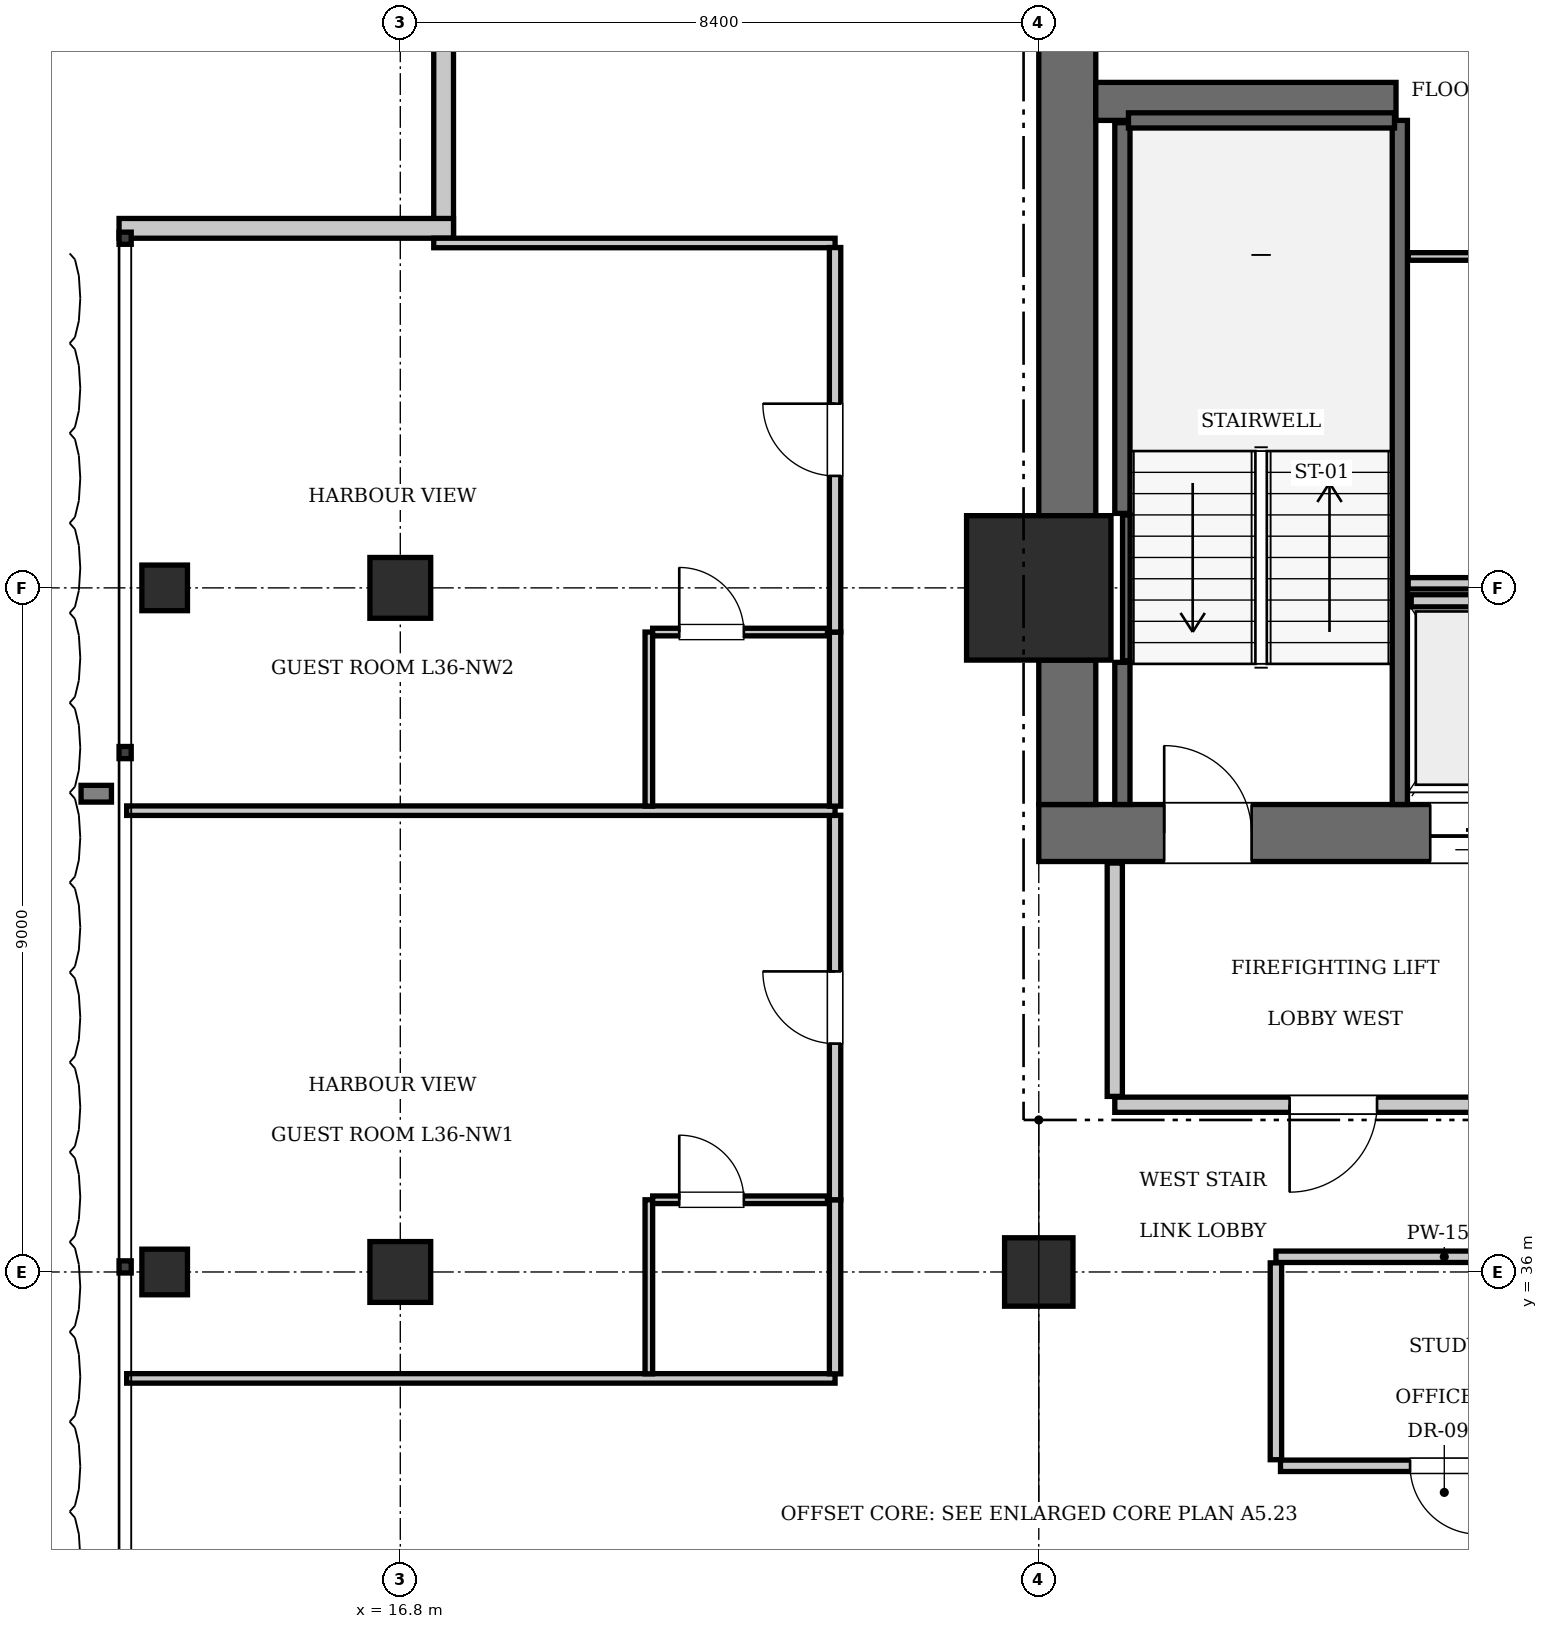
"""IFC4 building model, lengths in metres.
Left out: names, types, materials, properties, quantities, classifications, styles, units other than length and angle.
Written with IfcOpenShell. Run it as: python <this file> out.ifc"""

import sys

from ifc_helpers import new_model, si_unit, direction, frame, frame_2d, origin, origin_2d, place, context, subcontext, project, spatial, rectangle, i_section, extrude, element, fill, save


model = new_model("IFC4")
c1 = context("Model", 3, precision=1e-05, world=origin(), true_north=direction((0.0, 1.0)))
c2 = subcontext(c1, "Body", "Model", "MODEL_VIEW")
j1 = project(units=[si_unit("LENGTHUNIT", "METRE"), si_unit("PLANEANGLEUNIT", "RADIAN")], contexts=[c1])
p1 = place(None, origin())
s1 = spatial("IfcSite", under=j1, at=p1, CompositionType="ELEMENT")
p2 = place(p1, origin())
s2 = spatial("IfcBuilding", under=s1, at=p2, CompositionType="ELEMENT")
p3 = place(p2, frame((0.0, 0.0, 150.5)))
s3 = spatial("IfcBuildingStorey", under=s2, at=p3, CompositionType="ELEMENT", Elevation=150.5)
p4 = place(p3, frame((25.2, 45.0, 0.0), z_axis=(0.0, 0.0, 1.0), x_axis=(1.0, 0.0, 0.0)))
e1 = element("IfcColumn", 1, at=p4, inside=s3, PredefinedType="COLUMN", context=c2, shape_type="SweptSolid", body=[
    extrude(rectangle(XDim=1.9, YDim=1.9, at=origin_2d()), origin(), (0.0, 0.0, 1.0), 3.85),
])
p5 = place(p3, frame((25.2, 41.775, 0.0), z_axis=(0.0, 0.0, 1.0), x_axis=(1.0, 0.0, 0.0)))
e2 = element("IfcWall", 2, at=p5, inside=s3, PredefinedType="SHEAR", context=c2, shape_type="SweptSolid", body=[
    extrude(rectangle(XDim=6.8, YDim=0.75, at=frame_2d((3.4, 0.0))), origin(), (0.0, 0.0, 1.0), 3.85),
])
p6 = place(p5, frame((1.65, 0.0, 0.0)))
e3 = element("IfcOpeningElement", 3, at=p6, cuts=e2, PredefinedType="OPENING", context=c2, shape_type="SweptSolid", body=[
    extrude(rectangle(XDim=1.15, YDim=2.15, at=frame_2d((0.575, 1.075))), frame((0.0, 0.385, 0.0), z_axis=(0.0, -1.0, 0.0), x_axis=(1.0, 0.0, 0.0)), (0.0, 0.0, 1.0), 0.77),
])
p7 = place(p5, frame((5.15, 0.0, 0.0)))
e4 = element("IfcOpeningElement", 4, at=p7, cuts=e2, PredefinedType="OPENING", context=c2, shape_type="SweptSolid", body=[
    extrude(rectangle(XDim=1.1, YDim=2.2, at=frame_2d((0.55, 1.1))), frame((0.0, 0.385, 0.0), z_axis=(0.0, -1.0, 0.0), x_axis=(1.0, 0.0, 0.0)), (0.0, 0.0, 1.0), 0.77),
])
p8 = place(p3, frame((25.575, 42.15, 0.0), z_axis=(0.0, 0.0, 1.0), x_axis=(0.0, 1.0, 0.0)))
e5 = element("IfcWall", 5, at=p8, inside=s3, PredefinedType="SHEAR", context=c2, shape_type="SweptSolid", body=[
    extrude(rectangle(XDim=1.9, YDim=0.75, at=frame_2d((0.95, 0.0))), origin(), (0.0, 0.0, 1.0), 3.85),
])
p9 = place(p3, frame((25.575, 45.95, 0.0), z_axis=(0.0, 0.0, 1.0), x_axis=(0.0, 1.0, 0.0)))
e6 = element("IfcWall", 6, at=p9, inside=s3, PredefinedType="SHEAR", context=c2, shape_type="SweptSolid", body=[
    extrude(rectangle(XDim=7.3, YDim=0.75, at=frame_2d((3.65, 0.0))), origin(), (0.0, 0.0, 1.0), 3.85),
])
p10 = place(p3, frame((25.95, 51.4, 0.0), z_axis=(0.0, 0.0, 1.0), x_axis=(1.0, 0.0, 0.0)))
e7 = element("IfcWall", 7, at=p10, inside=s3, PredefinedType="SHEAR", context=c2, shape_type="SweptSolid", body=[
    extrude(rectangle(XDim=3.95, YDim=0.5, at=frame_2d((1.975, 0.0))), origin(), (0.0, 0.0, 1.0), 3.85),
])
p11 = place(p3, frame((25.2, 36.0, 0.0), z_axis=(0.0, 0.0, 1.0), x_axis=(1.0, 0.0, 0.0)))
e8 = element("IfcColumn", 8, at=p11, inside=s3, PredefinedType="COLUMN", context=c2, shape_type="SweptSolid", body=[
    extrude(rectangle(XDim=0.9, YDim=0.9, at=origin_2d()), origin(), (0.0, 0.0, 1.0), 3.85),
])
for number, where, z_axis, x_axis in (
    (9, (16.8, 36.0, 0.0), (0.0, 0.0, 1.0), (1.0, 0.0, 0.0)),
    (10, (16.8, 45.0, 0.0), (0.0, 0.0, 1.0), (1.0, 0.0, 0.0)),
):
    element("IfcColumn", number, at=place(p3, frame(where, z_axis=z_axis, x_axis=x_axis)), inside=s3, PredefinedType="COLUMN", context=c2, shape_type="SweptSolid", body=[
        extrude(rectangle(XDim=0.8, YDim=0.8, at=origin_2d()), origin(), (0.0, 0.0, 1.0), 3.85),
    ])
for number, where, z_axis, x_axis in (
    (11, (13.7, 36.0, 0.0), (0.0, 0.0, 1.0), (1.0, 0.0, 0.0)),
    (12, (13.7, 45.0, 0.0), (0.0, 0.0, 1.0), (1.0, 0.0, 0.0)),
):
    element("IfcColumn", number, at=place(p3, frame(where, z_axis=z_axis, x_axis=x_axis)), inside=s3, PredefinedType="COLUMN", context=c2, shape_type="SweptSolid", body=[
        extrude(i_section(OverallWidth=0.6, OverallDepth=0.6, WebThickness=0.025, FlangeThickness=0.038, at=origin_2d()), origin(), (0.0, 0.0, 1.0), 3.85),
    ])
p12 = place(p3, frame((29.95, 42.15, 0.0), z_axis=(0.0, 0.0, 1.0), x_axis=(0.0, 1.0, 0.0)))
e13 = element("IfcWall", 13, at=p12, inside=s3, PredefinedType="SOLIDWALL", context=c2, shape_type="SweptSolid", body=[
    extrude(rectangle(XDim=9.0, YDim=0.2, at=frame_2d((4.5, 0.0))), origin(), (0.0, 0.0, 1.0), 3.61),
])
p13 = place(p3, frame((26.3, 42.15, 0.0), z_axis=(0.0, 0.0, 1.0), x_axis=(0.0, 1.0, 0.0)))
e14 = element("IfcWall", 14, at=p13, inside=s3, PredefinedType="SOLIDWALL", context=c2, shape_type="SweptSolid", body=[
    extrude(rectangle(XDim=1.87, YDim=0.2, at=frame_2d((0.935, 0.0))), origin(), (0.0, 0.0, 1.0), 3.61),
])
p14 = place(p3, frame((26.3, 45.98, 0.0), z_axis=(0.0, 0.0, 1.0), x_axis=(0.0, 1.0, 0.0)))
e15 = element("IfcWall", 15, at=p14, inside=s3, PredefinedType="SOLIDWALL", context=c2, shape_type="SweptSolid", body=[
    extrude(rectangle(XDim=5.14, YDim=0.2, at=frame_2d((2.57, 0.0))), origin(), (0.0, 0.0, 1.0), 3.61),
])
p15 = place(p3, frame((26.38, 51.15, 0.0), z_axis=(0.0, 0.0, 1.0), x_axis=(1.0, 0.0, 0.0)))
e16 = element("IfcWall", 16, at=p15, inside=s3, PredefinedType="SOLIDWALL", context=c2, shape_type="SweptSolid", body=[
    extrude(rectangle(XDim=3.5, YDim=0.2, at=frame_2d((1.75, 0.0))), origin(), (0.0, 0.0, 1.0), 3.61),
])
p16 = place(p3, frame((26.352, 44.04, 0.0), z_axis=(0.0, 0.0, 1.0), x_axis=(0.0, 1.0, 0.0)))
e17 = element("IfcWall", 17, at=p16, inside=s3, PredefinedType="SOLIDWALL", context=c2, shape_type="SweptSolid", body=[
    extrude(rectangle(XDim=1.92, YDim=0.1, at=frame_2d((0.96, 0.0))), origin(), (0.0, 0.0, 1.0), 3.61),
])
p17 = place(p3, frame((30.1, 44.83, 0.0), z_axis=(0.0, 0.0, 1.0), x_axis=(1.0, 0.0, 0.0)))
e18 = element("IfcWall", 18, at=p17, inside=s3, PredefinedType="SOLIDWALL", context=c2, shape_type="SweptSolid", body=[
    extrude(rectangle(XDim=1.6, YDim=0.16, at=frame_2d((0.8, 0.0))), origin(), (0.0, 0.0, 1.0), 3.61),
])
for number, where, z_axis, x_axis in (
    (19, (17.37, 49.6, 0.0), (0.0, 0.0, 1.0), (0.0, 1.0, 0.0)),
    (20, (13.1, 49.73, 0.0), (0.0, 0.0, 1.0), (1.0, 0.0, 0.0)),
):
    element("IfcWall", number, at=place(p3, frame(where, z_axis=z_axis, x_axis=x_axis)), inside=s3, PredefinedType="SOLIDWALL", context=c2, shape_type="SweptSolid", body=[
        extrude(rectangle(XDim=4.4, YDim=0.26, at=frame_2d((2.2, 0.0))), origin(), (0.0, 0.0, 1.0), 3.61),
    ])
p18 = place(p3, frame((26.2, 38.2, 0.0), z_axis=(0.0, 0.0, 1.0), x_axis=(1.0, 0.0, 0.0)))
e21 = element("IfcWall", 21, at=p18, inside=s3, PredefinedType="PARTITIONING", context=c2, shape_type="SweptSolid", body=[
    extrude(rectangle(XDim=5.8, YDim=0.2, at=frame_2d((2.9, 0.0))), origin(), (0.0, 0.0, 1.0), 3.61),
])
p19 = place(p18, frame((2.3, 0.0, 0.0)))
e22 = element("IfcOpeningElement", 22, at=p19, cuts=e21, PredefinedType="OPENING", context=c2, shape_type="SweptSolid", body=[
    extrude(rectangle(XDim=1.15, YDim=2.15, at=frame_2d((0.575, 1.075))), frame((0.0, 0.11, 0.0), z_axis=(0.0, -1.0, 0.0), x_axis=(1.0, 0.0, 0.0)), (0.0, 0.0, 1.0), 0.22),
])
p20 = place(p3, frame((26.2, 38.31, 0.0), z_axis=(0.0, 0.0, 1.0), x_axis=(0.0, 1.0, 0.0)))
e23 = element("IfcWall", 23, at=p20, inside=s3, PredefinedType="PARTITIONING", context=c2, shape_type="SweptSolid", body=[
    extrude(rectangle(XDim=3.07, YDim=0.2, at=frame_2d((1.535, 0.0))), origin(), (0.0, 0.0, 1.0), 3.61),
])
p21 = place(p3, frame((30.06, 45.06, 0.0), z_axis=(0.0, 0.0, 1.0), x_axis=(1.0, 0.0, 0.0)))
e24 = element("IfcWall", 24, at=p21, inside=s3, PredefinedType="PARTITIONING", context=c2, shape_type="SweptSolid", body=[
    extrude(rectangle(XDim=3.18, YDim=0.15, at=frame_2d((1.59, 0.0))), origin(), (0.0, 0.0, 1.0), 3.61),
])
p22 = place(p3, frame((30.06, 49.36, 0.0), z_axis=(0.0, 0.0, 1.0), x_axis=(1.0, 0.0, 0.0)))
e25 = element("IfcWall", 25, at=p22, inside=s3, PredefinedType="PARTITIONING", context=c2, shape_type="SweptSolid", body=[
    extrude(rectangle(XDim=3.18, YDim=0.1, at=frame_2d((1.59, 0.0))), origin(), (0.0, 0.0, 1.0), 3.61),
])
p23 = place(p22, frame((1.95, 0.0, 0.0)))
e26 = element("IfcOpeningElement", 26, at=p23, cuts=e25, PredefinedType="OPENING", context=c2, shape_type="SweptSolid", body=[
    extrude(rectangle(XDim=0.8, YDim=2.05, at=frame_2d((0.4, 1.025))), frame((0.0, 0.06, 0.0), z_axis=(0.0, -1.0, 0.0), x_axis=(1.0, 0.0, 0.0)), (0.0, 0.0, 1.0), 0.12),
])
p24 = place(p3, frame((28.32, 36.2, 0.0), z_axis=(0.0, 0.0, 1.0), x_axis=(1.0, 0.0, 0.0)))
e27 = element("IfcWall", 27, at=p24, inside=s3, PredefinedType="PARTITIONING", context=c2, shape_type="SweptSolid", body=[
    extrude(rectangle(XDim=4.43, YDim=0.15, at=frame_2d((2.215, 0.0))), origin(), (0.0, 0.0, 1.0), 3.61),
])
p25 = place(p3, frame((28.32, 33.53, 0.0), z_axis=(0.0, 0.0, 1.0), x_axis=(0.0, 1.0, 0.0)))
e28 = element("IfcWall", 28, at=p25, inside=s3, PredefinedType="PARTITIONING", context=c2, shape_type="SweptSolid", body=[
    extrude(rectangle(XDim=2.59, YDim=0.15, at=frame_2d((1.295, 0.0))), origin(), (0.0, 0.0, 1.0), 3.61),
])
p26 = place(p3, frame((28.38, 33.45, 0.0), z_axis=(0.0, 0.0, 1.0), x_axis=(1.0, 0.0, 0.0)))
e29 = element("IfcWall", 29, at=p26, inside=s3, PredefinedType="PARTITIONING", context=c2, shape_type="SweptSolid", body=[
    extrude(rectangle(XDim=4.31, YDim=0.15, at=frame_2d((2.155, 0.0))), origin(), (0.0, 0.0, 1.0), 3.61),
])
p27 = place(p26, frame((1.705, 0.0, 0.0)))
e30 = element("IfcOpeningElement", 30, at=p27, cuts=e29, PredefinedType="OPENING", context=c2, shape_type="SweptSolid", body=[
    extrude(rectangle(XDim=0.9, YDim=2.1, at=frame_2d((0.45, 1.05))), frame((0.0, 0.085, 0.0), z_axis=(0.0, -1.0, 0.0), x_axis=(1.0, 0.0, 0.0)), (0.0, 0.0, 1.0), 0.17),
])
p28 = place(p3, frame((13.2, 34.6, 0.0), z_axis=(0.0, 0.0, 1.0), x_axis=(1.0, 0.0, 0.0)))
e31 = element("IfcWall", 31, at=p28, inside=s3, PredefinedType="PARTITIONING", context=c2, shape_type="SweptSolid", body=[
    extrude(rectangle(XDim=9.32, YDim=0.125, at=frame_2d((4.66, 0.0))), origin(), (0.0, 0.0, 1.0), 3.61),
])
p29 = place(p3, frame((17.24, 49.538, 0.0), z_axis=(0.0, 0.0, 1.0), x_axis=(1.0, 0.0, 0.0)))
e32 = element("IfcWall", 32, at=p29, inside=s3, PredefinedType="PARTITIONING", context=c2, shape_type="SweptSolid", body=[
    extrude(rectangle(XDim=5.28, YDim=0.125, at=frame_2d((2.64, 0.0))), origin(), (0.0, 0.0, 1.0), 3.61),
])
p30 = place(p3, frame((22.52, 34.66, 0.0), z_axis=(0.0, 0.0, 1.0), x_axis=(0.0, 1.0, 0.0)))
e33 = element("IfcWall", 33, at=p30, inside=s3, PredefinedType="PARTITIONING", context=c2, shape_type="SweptSolid", body=[
    extrude(rectangle(XDim=2.29, YDim=0.15, at=frame_2d((1.145, 0.0))), origin(), (0.0, 0.0, 1.0), 3.61),
])
p31 = place(p3, frame((22.52, 36.95, 0.0), z_axis=(0.0, 0.0, 1.0), x_axis=(0.0, 1.0, 0.0)))
e34 = element("IfcWall", 34, at=p31, inside=s3, PredefinedType="PARTITIONING", context=c2, shape_type="SweptSolid", body=[
    extrude(rectangle(XDim=5.059, YDim=0.15, at=frame_2d((2.529, 0.0))), origin(), (0.0, 0.0, 1.0), 3.61),
])
p32 = place(p31, frame((2.054, 0.0, 0.0)))
e35 = element("IfcOpeningElement", 35, at=p32, cuts=e34, PredefinedType="OPENING", context=c2, shape_type="SweptSolid", body=[
    extrude(rectangle(XDim=0.95, YDim=2.15, at=frame_2d((0.475, 1.075))), frame((0.0, 0.085, 0.0), z_axis=(0.0, -1.0, 0.0), x_axis=(1.0, 0.0, 0.0)), (0.0, 0.0, 1.0), 0.17),
])
p33 = place(p3, frame((20.07, 34.66, 0.0), z_axis=(0.0, 0.0, 1.0), x_axis=(0.0, 1.0, 0.0)))
e36 = element("IfcWall", 36, at=p33, inside=s3, PredefinedType="PARTITIONING", context=c2, shape_type="SweptSolid", body=[
    extrude(rectangle(XDim=2.29, YDim=0.1, at=frame_2d((1.145, 0.0))), origin(), (0.0, 0.0, 1.0), 3.61),
])
p34 = place(p3, frame((20.12, 36.95, 0.0), z_axis=(0.0, 0.0, 1.0), x_axis=(1.0, 0.0, 0.0)))
e37 = element("IfcWall", 37, at=p34, inside=s3, PredefinedType="PARTITIONING", context=c2, shape_type="SweptSolid", body=[
    extrude(rectangle(XDim=2.3, YDim=0.1, at=frame_2d((1.15, 0.0))), origin(), (0.0, 0.0, 1.0), 3.61),
])
p35 = place(p34, frame((0.35, 0.0, 0.0)))
e38 = element("IfcOpeningElement", 38, at=p35, cuts=e37, PredefinedType="OPENING", context=c2, shape_type="SweptSolid", body=[
    extrude(rectangle(XDim=0.85, YDim=2.1, at=frame_2d((0.425, 1.05))), frame((0.0, 0.06, 0.0), z_axis=(0.0, -1.0, 0.0), x_axis=(1.0, 0.0, 0.0)), (0.0, 0.0, 1.0), 0.12),
])
p36 = place(p3, frame((13.2, 42.069, 0.0), z_axis=(0.0, 0.0, 1.0), x_axis=(1.0, 0.0, 0.0)))
e39 = element("IfcWall", 39, at=p36, inside=s3, PredefinedType="PARTITIONING", context=c2, shape_type="SweptSolid", body=[
    extrude(rectangle(XDim=9.32, YDim=0.125, at=frame_2d((4.66, 0.0))), origin(), (0.0, 0.0, 1.0), 3.61),
])
p37 = place(p3, frame((22.52, 42.129, 0.0), z_axis=(0.0, 0.0, 1.0), x_axis=(0.0, 1.0, 0.0)))
e40 = element("IfcWall", 40, at=p37, inside=s3, PredefinedType="PARTITIONING", context=c2, shape_type="SweptSolid", body=[
    extrude(rectangle(XDim=2.29, YDim=0.15, at=frame_2d((1.145, 0.0))), origin(), (0.0, 0.0, 1.0), 3.61),
])
p38 = place(p3, frame((22.52, 44.419, 0.0), z_axis=(0.0, 0.0, 1.0), x_axis=(0.0, 1.0, 0.0)))
e41 = element("IfcWall", 41, at=p38, inside=s3, PredefinedType="PARTITIONING", context=c2, shape_type="SweptSolid", body=[
    extrude(rectangle(XDim=5.059, YDim=0.15, at=frame_2d((2.529, 0.0))), origin(), (0.0, 0.0, 1.0), 3.61),
])
p39 = place(p38, frame((2.054, 0.0, 0.0)))
e42 = element("IfcOpeningElement", 42, at=p39, cuts=e41, PredefinedType="OPENING", context=c2, shape_type="SweptSolid", body=[
    extrude(rectangle(XDim=0.95, YDim=2.15, at=frame_2d((0.475, 1.075))), frame((0.0, 0.085, 0.0), z_axis=(0.0, -1.0, 0.0), x_axis=(1.0, 0.0, 0.0)), (0.0, 0.0, 1.0), 0.17),
])
p40 = place(p3, frame((20.07, 42.129, 0.0), z_axis=(0.0, 0.0, 1.0), x_axis=(0.0, 1.0, 0.0)))
e43 = element("IfcWall", 43, at=p40, inside=s3, PredefinedType="PARTITIONING", context=c2, shape_type="SweptSolid", body=[
    extrude(rectangle(XDim=2.29, YDim=0.1, at=frame_2d((1.145, 0.0))), origin(), (0.0, 0.0, 1.0), 3.61),
])
p41 = place(p3, frame((20.12, 44.419, 0.0), z_axis=(0.0, 0.0, 1.0), x_axis=(1.0, 0.0, 0.0)))
e44 = element("IfcWall", 44, at=p41, inside=s3, PredefinedType="PARTITIONING", context=c2, shape_type="SweptSolid", body=[
    extrude(rectangle(XDim=2.3, YDim=0.1, at=frame_2d((1.15, 0.0))), origin(), (0.0, 0.0, 1.0), 3.61),
])
p42 = place(p41, frame((0.35, 0.0, 0.0)))
e45 = element("IfcOpeningElement", 45, at=p42, cuts=e44, PredefinedType="OPENING", context=c2, shape_type="SweptSolid", body=[
    extrude(rectangle(XDim=0.85, YDim=2.1, at=frame_2d((0.425, 1.05))), frame((0.0, 0.06, 0.0), z_axis=(0.0, -1.0, 0.0), x_axis=(1.0, 0.0, 0.0)), (0.0, 0.0, 1.0), 0.12),
])
p43 = place(p6, origin())
e46 = element("IfcDoor", 46, at=p43, inside=s3, OperationType="SINGLE_SWING_LEFT", PredefinedType="DOOR", context=c2, shape_type="SweptSolid", body=[
    extrude(rectangle(XDim=1.15, YDim=2.15, at=frame_2d((0.575, 1.075))), frame((0.0, 0.025, 0.0), z_axis=(0.0, -1.0, 0.0), x_axis=(1.0, 0.0, 0.0)), (0.0, 0.0, 1.0), 0.05),
])
fill(e3, e46)
p44 = place(p7, frame((1.1, 0.0, 0.0), z_axis=(0.0, 0.0, 1.0), x_axis=(-1.0, 0.0, 0.0)))
e47 = element("IfcDoor", 47, at=p44, inside=s3, OperationType="SLIDING_TO_LEFT", PredefinedType="DOOR", context=c2, shape_type="SweptSolid", body=[
    extrude(rectangle(XDim=1.1, YDim=2.2, at=frame_2d((0.55, 1.1))), frame((0.0, 0.025, 0.0), z_axis=(0.0, -1.0, 0.0), x_axis=(1.0, 0.0, 0.0)), (0.0, 0.0, 1.0), 0.05),
])
fill(e4, e47)
p45 = place(p19, frame((1.15, 0.0, 0.0), z_axis=(0.0, 0.0, 1.0), x_axis=(-1.0, 0.0, 0.0)))
e48 = element("IfcDoor", 48, at=p45, inside=s3, OperationType="SINGLE_SWING_RIGHT", PredefinedType="DOOR", context=c2, shape_type="SweptSolid", body=[
    extrude(rectangle(XDim=1.15, YDim=2.15, at=frame_2d((0.575, 1.075))), frame((0.0, 0.025, 0.0), z_axis=(0.0, -1.0, 0.0), x_axis=(1.0, 0.0, 0.0)), (0.0, 0.0, 1.0), 0.05),
])
fill(e22, e48)
p46 = place(p27, frame((0.9, 0.0, 0.0), z_axis=(0.0, 0.0, 1.0), x_axis=(-1.0, 0.0, 0.0)))
e49 = element("IfcDoor", 49, at=p46, inside=s3, OperationType="SINGLE_SWING_LEFT", PredefinedType="DOOR", context=c2, shape_type="SweptSolid", body=[
    extrude(rectangle(XDim=0.9, YDim=2.1, at=frame_2d((0.45, 1.05))), frame((0.0, 0.025, 0.0), z_axis=(0.0, -1.0, 0.0), x_axis=(1.0, 0.0, 0.0)), (0.0, 0.0, 1.0), 0.05),
])
fill(e30, e49)
p47 = place(p35, origin())
e50 = element("IfcDoor", 50, at=p47, inside=s3, OperationType="SINGLE_SWING_LEFT", PredefinedType="DOOR", context=c2, shape_type="SweptSolid", body=[
    extrude(rectangle(XDim=0.85, YDim=2.1, at=frame_2d((0.425, 1.05))), frame((0.0, 0.025, 0.0), z_axis=(0.0, -1.0, 0.0), x_axis=(1.0, 0.0, 0.0)), (0.0, 0.0, 1.0), 0.05),
])
fill(e38, e50)
p48 = place(p32, origin())
e51 = element("IfcDoor", 51, at=p48, inside=s3, OperationType="SINGLE_SWING_RIGHT", PredefinedType="DOOR", context=c2, shape_type="SweptSolid", body=[
    extrude(rectangle(XDim=0.95, YDim=2.15, at=frame_2d((0.475, 1.075))), frame((0.0, 0.025, 0.0), z_axis=(0.0, -1.0, 0.0), x_axis=(1.0, 0.0, 0.0)), (0.0, 0.0, 1.0), 0.05),
])
fill(e35, e51)
p49 = place(p42, origin())
e52 = element("IfcDoor", 52, at=p49, inside=s3, OperationType="SINGLE_SWING_LEFT", PredefinedType="DOOR", context=c2, shape_type="SweptSolid", body=[
    extrude(rectangle(XDim=0.85, YDim=2.1, at=frame_2d((0.425, 1.05))), frame((0.0, 0.025, 0.0), z_axis=(0.0, -1.0, 0.0), x_axis=(1.0, 0.0, 0.0)), (0.0, 0.0, 1.0), 0.05),
])
fill(e45, e52)
p50 = place(p39, origin())
e53 = element("IfcDoor", 53, at=p50, inside=s3, OperationType="SINGLE_SWING_RIGHT", PredefinedType="DOOR", context=c2, shape_type="SweptSolid", body=[
    extrude(rectangle(XDim=0.95, YDim=2.15, at=frame_2d((0.475, 1.075))), frame((0.0, 0.025, 0.0), z_axis=(0.0, -1.0, 0.0), x_axis=(1.0, 0.0, 0.0)), (0.0, 0.0, 1.0), 0.05),
])
fill(e42, e53)
save(model, sys.argv[1])
